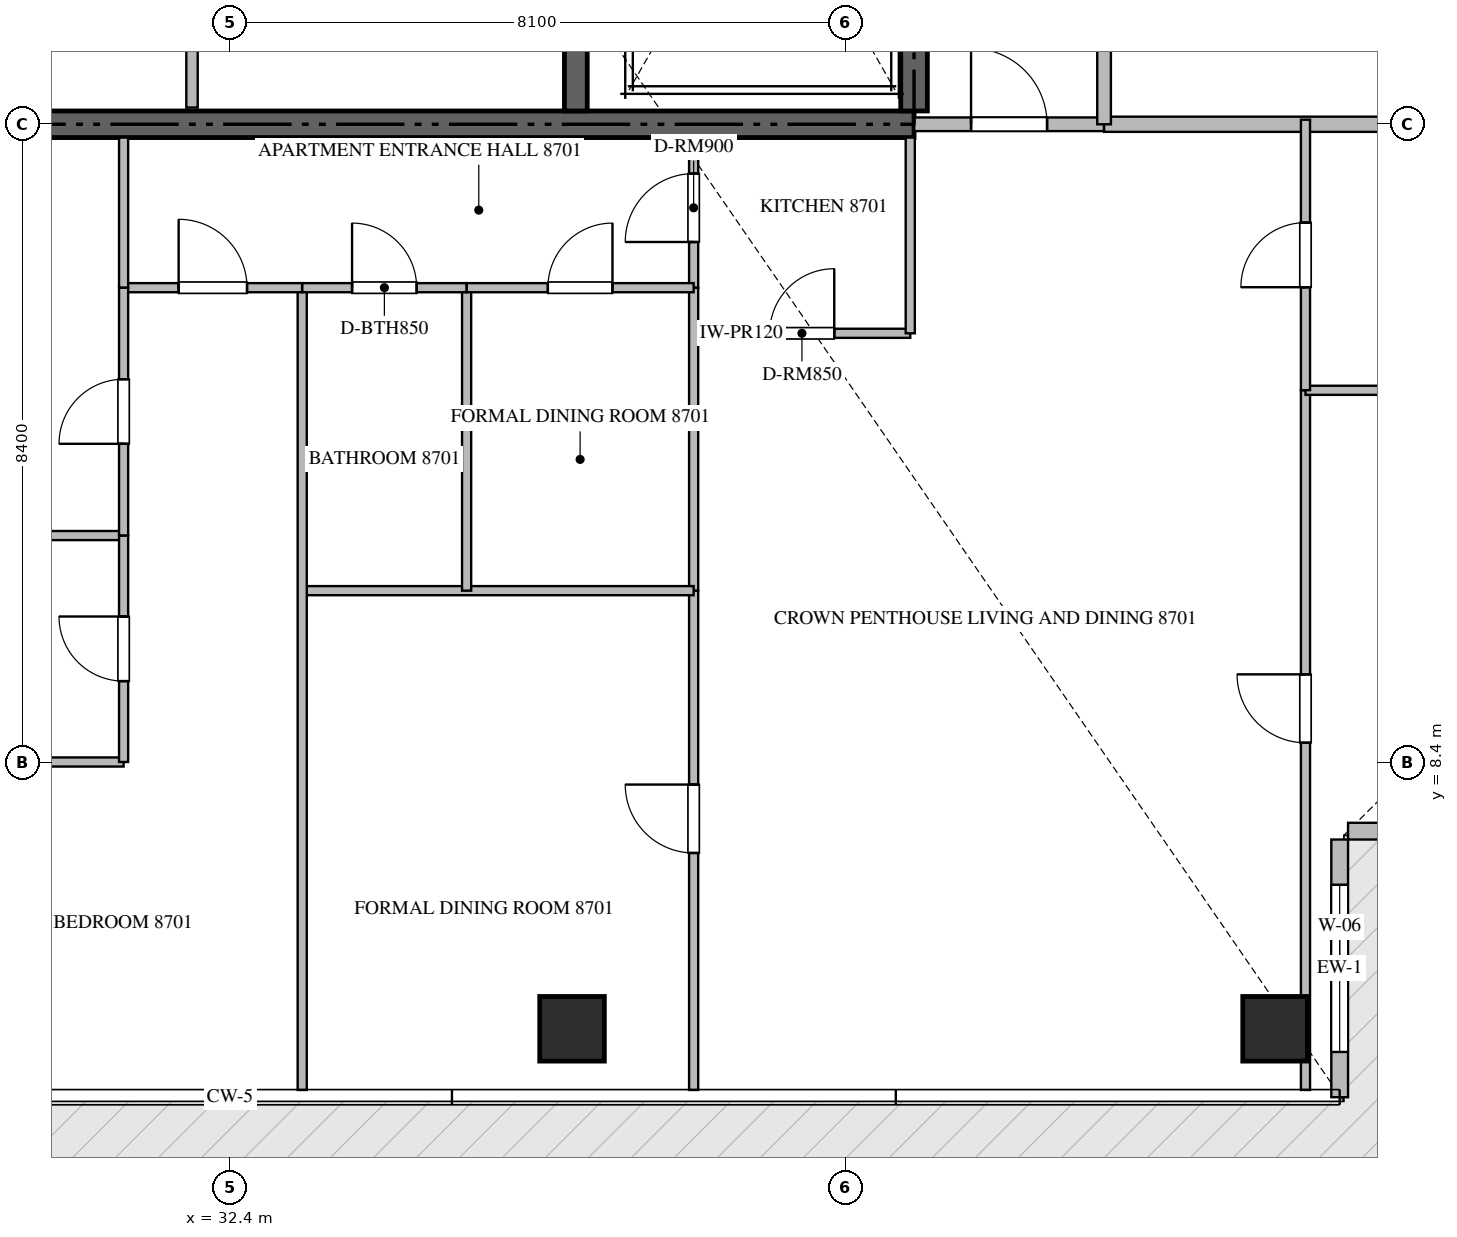
"""IFC4 building model, lengths in metres.
Left out: names, types, materials, properties, quantities, classifications, styles, units other than length and angle.
Written with IfcOpenShell. Run it as: python <this file> out.ifc"""

import sys

from ifc_helpers import new_model, si_unit, direction, frame, frame_2d, origin, origin_2d, place, context, subcontext, project, spatial, rectangle, extrude, source, transform, mapped, element, fill, save


model = new_model("IFC4")
c1 = context("Model", 3, precision=1e-05, world=origin(), true_north=direction((0.0, 1.0)))
c2 = subcontext(c1, "Body", "Model", "MODEL_VIEW")
j1 = project(units=[si_unit("LENGTHUNIT", "METRE"), si_unit("PLANEANGLEUNIT", "RADIAN")], contexts=[c1])
p1 = place(None, origin())
s1 = spatial("IfcSite", under=j1, at=p1, CompositionType="ELEMENT")
p2 = place(p1, origin())
s2 = spatial("IfcBuilding", under=s1, at=p2, CompositionType="ELEMENT")
p3 = place(p2, frame((0.0, 0.0, 353.85)))
s3 = spatial("IfcBuildingStorey", under=s2, at=p3, CompositionType="ELEMENT", Elevation=353.85)
p4 = place(p3, frame((23.4, 16.8, -0.26), z_axis=(0.0, 0.0, 1.0), x_axis=(1.0, 0.0, 0.0)))
e1 = element("IfcWall", 1, at=p4, inside=s3, PredefinedType="SHEAR", context=c2, shape_type="SweptSolid", body=[
    extrude(rectangle(XDim=18.0, YDim=0.35, at=frame_2d((9.0, 0.0))), origin(), (0.0, 0.0, 1.0), 5.798),
])
p5 = place(p3, frame((41.4, 16.975, -0.26), z_axis=(0.0, 0.0, 1.0), x_axis=(0.0, 1.0, 0.0)))
e2 = element("IfcWall", 2, at=p5, inside=s3, PredefinedType="SHEAR", context=c2, shape_type="SweptSolid", body=[
    extrude(rectangle(XDim=8.375, YDim=0.35, at=frame_2d((4.188, 0.0))), origin(), (0.0, 0.0, 1.0), 5.798),
])
p6 = place(p3, frame((36.95, 16.975, -0.26), z_axis=(0.0, 0.0, 1.0), x_axis=(0.0, 1.0, 0.0)))
e3 = element("IfcWall", 3, at=p6, inside=s3, PredefinedType="SHEAR", context=c2, shape_type="SweptSolid", body=[
    extrude(rectangle(XDim=8.375, YDim=0.3, at=frame_2d((4.188, 0.0))), origin(), (0.0, 0.0, 1.0), 5.798),
])
m1 = source(origin(), c2, "Body", "SweptSolid", [
    extrude(rectangle(XDim=0.85, YDim=0.85, at=origin_2d()), origin(), (0.0, 0.0, 1.0), 5.8),
])
for number, where, z_axis, x_axis in (
    (4, (36.9, 4.9, -0.26), (0.0, 0.0, 1.0), (1.0, 0.0, 0.0)),
    (5, (46.15, 4.9, -0.26), (0.0, 0.0, 1.0), (1.0, 0.0, 0.0)),
):
    element("IfcColumn", number, at=place(p3, frame(where, z_axis=z_axis, x_axis=x_axis)), inside=s3, PredefinedType="COLUMN", context=c2, shape_type="MappedRepresentation", body=[
        mapped(m1, transform((0.0, 0.0, 0.0), scale=1.0)),
    ])
p7 = place(p3, frame((47.0, 4.0, 0.0), z_axis=(0.0, 0.0, 1.0), x_axis=(0.0, 1.0, 0.0)))
e6 = element("IfcWall", 6, at=p7, inside=s3, PredefinedType="ELEMENTEDWALL", context=c2, shape_type="SweptSolid", body=[
    extrude(rectangle(XDim=3.39, YDim=0.22, at=frame_2d((1.695, 0.0))), origin(), (0.0, 0.0, 1.0), 5.525),
])
p8 = place(p7, frame((0.595, 0.0, 0.65)))
e7 = element("IfcOpeningElement", 7, at=p8, cuts=e6, PredefinedType="OPENING", context=c2, shape_type="SweptSolid", body=[
    extrude(rectangle(XDim=2.2, YDim=2.4, at=frame_2d((1.1, 1.2))), frame((0.0, 0.12, 0.0), z_axis=(0.0, -1.0, 0.0), x_axis=(1.0, 0.0, 0.0)), (0.0, 0.0, 1.0), 0.24),
])
p9 = place(p3, frame((47.11, 7.5, 0.0), z_axis=(0.0, 0.0, 1.0), x_axis=(1.0, 0.0, 0.0)))
e8 = element("IfcWall", 8, at=p9, inside=s3, PredefinedType="ELEMENTEDWALL", context=c2, shape_type="SweptSolid", body=[
    extrude(rectangle(XDim=3.28, YDim=0.22, at=frame_2d((1.64, 0.0))), origin(), (0.0, 0.0, 1.0), 5.525),
])
p10 = place(p9, frame((0.54, 0.0, 0.65)))
e9 = element("IfcOpeningElement", 9, at=p10, cuts=e8, PredefinedType="OPENING", context=c2, shape_type="SweptSolid", body=[
    extrude(rectangle(XDim=2.2, YDim=2.4, at=frame_2d((1.1, 1.2))), frame((0.0, 0.12, 0.0), z_axis=(0.0, -1.0, 0.0), x_axis=(1.0, 0.0, 0.0)), (0.0, 0.0, 1.0), 0.24),
])
p11 = place(p3, frame((31.9, 17.02, 0.0), z_axis=(0.0, 0.0, 1.0), x_axis=(0.0, 1.0, 0.0)))
e10 = element("IfcWall", 10, at=p11, inside=s3, PredefinedType="PARTITIONING", context=c2, shape_type="SweptSolid", body=[
    extrude(rectangle(XDim=2.73, YDim=0.15, at=frame_2d((1.365, 0.0))), origin(), (0.0, 0.0, 1.0), 5.54),
])
p12 = place(p3, frame((43.9, 16.8, 0.0), z_axis=(0.0, 0.0, 1.0), x_axis=(1.0, 0.0, 0.0)))
e11 = element("IfcWall", 11, at=p12, inside=s3, PredefinedType="PARTITIONING", context=c2, shape_type="SweptSolid", body=[
    extrude(rectangle(XDim=10.018, YDim=0.2, at=frame_2d((5.009, 0.0))), origin(), (0.0, 0.0, 1.0), 5.54),
])
p13 = place(p3, frame((41.402, 16.8, 0.0), z_axis=(0.0, 0.0, 1.0), x_axis=(1.0, 0.0, 0.0)))
e12 = element("IfcWall", 12, at=p13, inside=s3, PredefinedType="PARTITIONING", context=c2, shape_type="SweptSolid", body=[
    extrude(rectangle(XDim=2.496, YDim=0.18, at=frame_2d((1.248, 0.0))), origin(), (0.0, 0.0, 1.0), 5.54),
])
p14 = place(p13, frame((0.748, 0.0, 0.0)))
e13 = element("IfcOpeningElement", 13, at=p14, cuts=e12, PredefinedType="OPENING", context=c2, shape_type="SweptSolid", body=[
    extrude(rectangle(XDim=1.0, YDim=2.15, at=frame_2d((0.5, 1.075))), frame((0.0, 0.1, 0.0), z_axis=(0.0, -1.0, 0.0), x_axis=(1.0, 0.0, 0.0)), (0.0, 0.0, 1.0), 0.2),
])
p15 = place(p3, frame((43.9, 16.8, 0.0), z_axis=(0.0, 0.0, 1.0), x_axis=(0.0, 1.0, 0.0)))
e14 = element("IfcWall", 14, at=p15, inside=s3, PredefinedType="PARTITIONING", context=c2, shape_type="SweptSolid", body=[
    extrude(rectangle(XDim=16.8, YDim=0.18, at=frame_2d((8.4, 0.0))), origin(), (0.0, 0.0, 1.0), 5.54),
])
p16 = place(p15, frame((14.5, 0.0, 0.0)))
e15 = element("IfcOpeningElement", 15, at=p16, cuts=e14, PredefinedType="OPENING", context=c2, shape_type="SweptSolid", body=[
    extrude(rectangle(XDim=1.0, YDim=2.15, at=frame_2d((0.5, 1.075))), frame((0.0, 0.1, 0.0), z_axis=(0.0, -1.0, 0.0), x_axis=(1.0, 0.0, 0.0)), (0.0, 0.0, 1.0), 0.2),
])
p17 = place(p3, frame((38.5, 14.05, 0.0), z_axis=(0.0, 0.0, 1.0), x_axis=(1.0, 0.0, 0.0)))
e16 = element("IfcWall", 16, at=p17, inside=s3, PredefinedType="PARTITIONING", context=c2, shape_type="SweptSolid", body=[
    extrude(rectangle(XDim=2.85, YDim=0.12, at=frame_2d((1.425, 0.0))), origin(), (0.0, 0.0, 1.0), 5.54),
])
p18 = place(p17, frame((1.0, 0.0, 0.0)))
e17 = element("IfcOpeningElement", 17, at=p18, cuts=e16, PredefinedType="OPENING", context=c2, shape_type="SweptSolid", body=[
    extrude(rectangle(XDim=0.85, YDim=2.1, at=frame_2d((0.425, 1.05))), frame((0.0, 0.07, 0.0), z_axis=(0.0, -1.0, 0.0), x_axis=(1.0, 0.0, 0.0)), (0.0, 0.0, 1.0), 0.14),
])
p19 = place(p3, frame((41.35, 14.05, 0.0), z_axis=(0.0, 0.0, 1.0), x_axis=(0.0, 1.0, 0.0)))
e18 = element("IfcWall", 18, at=p19, inside=s3, PredefinedType="PARTITIONING", context=c2, shape_type="SweptSolid", body=[
    extrude(rectangle(XDim=2.575, YDim=0.12, at=frame_2d((1.288, 0.0))), origin(), (0.0, 0.0, 1.0), 5.54),
])
p20 = place(p3, frame((38.5, 14.65, 0.0), z_axis=(0.0, 0.0, 1.0), x_axis=(0.0, 1.0, 0.0)))
e19 = element("IfcWall", 19, at=p20, inside=s3, PredefinedType="PARTITIONING", context=c2, shape_type="SweptSolid", body=[
    extrude(rectangle(XDim=1.975, YDim=0.12, at=frame_2d((0.988, 0.0))), origin(), (0.0, 0.0, 1.0), 5.54),
])
p21 = place(p20, frame((0.601, 0.0, 0.0)))
e20 = element("IfcOpeningElement", 20, at=p21, cuts=e19, PredefinedType="OPENING", context=c2, shape_type="SweptSolid", body=[
    extrude(rectangle(XDim=0.9, YDim=2.1, at=frame_2d((0.45, 1.05))), frame((0.0, 0.07, 0.0), z_axis=(0.0, -1.0, 0.0), x_axis=(1.0, 0.0, 0.0)), (0.0, 0.0, 1.0), 0.14),
])
p22 = place(p3, frame((38.5, 4.095, 0.0), z_axis=(0.0, 0.0, 1.0), x_axis=(0.0, 1.0, 0.0)))
e21 = element("IfcWall", 21, at=p22, inside=s3, PredefinedType="PARTITIONING", context=c2, shape_type="SweptSolid", body=[
    extrude(rectangle(XDim=6.569, YDim=0.12, at=frame_2d((3.285, 0.0))), origin(), (0.0, 0.0, 1.0), 5.54),
])
p23 = place(p22, frame((3.118, 0.0, 0.0)))
e22 = element("IfcOpeningElement", 22, at=p23, cuts=e21, PredefinedType="OPENING", context=c2, shape_type="SweptSolid", body=[
    extrude(rectangle(XDim=0.9, YDim=2.1, at=frame_2d((0.45, 1.05))), frame((0.0, 0.07, 0.0), z_axis=(0.0, -1.0, 0.0), x_axis=(1.0, 0.0, 0.0)), (0.0, 0.0, 1.0), 0.14),
])
p24 = place(p3, frame((38.5, 10.666, 0.0), z_axis=(0.0, 0.0, 1.0), x_axis=(0.0, 1.0, 0.0)))
e23 = element("IfcWall", 23, at=p24, inside=s3, PredefinedType="PARTITIONING", context=c2, shape_type="SweptSolid", body=[
    extrude(rectangle(XDim=3.982, YDim=0.12, at=frame_2d((1.991, 0.0))), origin(), (0.0, 0.0, 1.0), 5.54),
])
p25 = place(p3, frame((33.35, 10.664, 0.0), z_axis=(0.0, 0.0, 1.0), x_axis=(1.0, 0.0, 0.0)))
e24 = element("IfcWall", 24, at=p25, inside=s3, PredefinedType="PARTITIONING", context=c2, shape_type="SweptSolid", body=[
    extrude(rectangle(XDim=5.15, YDim=0.12, at=frame_2d((2.575, 0.0))), origin(), (0.0, 0.0, 1.0), 5.54),
])
p26 = place(p3, frame((33.35, 4.095, 0.0), z_axis=(0.0, 0.0, 1.0), x_axis=(0.0, 1.0, 0.0)))
e25 = element("IfcWall", 25, at=p26, inside=s3, PredefinedType="PARTITIONING", context=c2, shape_type="SweptSolid", body=[
    extrude(rectangle(XDim=10.555, YDim=0.12, at=frame_2d((5.277, 0.0))), origin(), (0.0, 0.0, 1.0), 5.54),
])
p27 = place(p3, frame((35.513, 10.664, 0.0), z_axis=(0.0, 0.0, 1.0), x_axis=(0.0, 1.0, 0.0)))
e26 = element("IfcWall", 26, at=p27, inside=s3, PredefinedType="PARTITIONING", context=c2, shape_type="SweptSolid", body=[
    extrude(rectangle(XDim=3.986, YDim=0.12, at=frame_2d((1.993, 0.0))), origin(), (0.0, 0.0, 1.0), 5.54),
])
p28 = place(p3, frame((33.35, 14.65, 0.0), z_axis=(0.0, 0.0, 1.0), x_axis=(1.0, 0.0, 0.0)))
e27 = element("IfcWall", 27, at=p28, inside=s3, PredefinedType="PARTITIONING", context=c2, shape_type="SweptSolid", body=[
    extrude(rectangle(XDim=2.163, YDim=0.12, at=frame_2d((1.082, 0.0))), origin(), (0.0, 0.0, 1.0), 5.54),
])
p29 = place(p28, frame((0.656, 0.0, 0.0)))
e28 = element("IfcOpeningElement", 28, at=p29, cuts=e27, PredefinedType="OPENING", context=c2, shape_type="SweptSolid", body=[
    extrude(rectangle(XDim=0.85, YDim=2.1, at=frame_2d((0.425, 1.05))), frame((0.0, 0.07, 0.0), z_axis=(0.0, -1.0, 0.0), x_axis=(1.0, 0.0, 0.0)), (0.0, 0.0, 1.0), 0.14),
])
p30 = place(p3, frame((35.515, 14.65, 0.0), z_axis=(0.0, 0.0, 1.0), x_axis=(1.0, 0.0, 0.0)))
e29 = element("IfcWall", 29, at=p30, inside=s3, PredefinedType="PARTITIONING", context=c2, shape_type="SweptSolid", body=[
    extrude(rectangle(XDim=2.985, YDim=0.12, at=frame_2d((1.493, 0.0))), origin(), (0.0, 0.0, 1.0), 5.54),
])
p31 = place(p30, frame((1.067, 0.0, 0.0)))
e30 = element("IfcOpeningElement", 30, at=p31, cuts=e29, PredefinedType="OPENING", context=c2, shape_type="SweptSolid", body=[
    extrude(rectangle(XDim=0.85, YDim=2.1, at=frame_2d((0.425, 1.05))), frame((0.0, 0.07, 0.0), z_axis=(0.0, -1.0, 0.0), x_axis=(1.0, 0.0, 0.0)), (0.0, 0.0, 1.0), 0.14),
])
p32 = place(p3, frame((31.0, 14.65, 0.0), z_axis=(0.0, 0.0, 1.0), x_axis=(1.0, 0.0, 0.0)))
e31 = element("IfcWall", 31, at=p32, inside=s3, PredefinedType="PARTITIONING", context=c2, shape_type="SweptSolid", body=[
    extrude(rectangle(XDim=2.348, YDim=0.12, at=frame_2d((1.174, 0.0))), origin(), (0.0, 0.0, 1.0), 5.54),
])
p33 = place(p32, frame((0.724, 0.0, 0.0)))
e32 = element("IfcOpeningElement", 32, at=p33, cuts=e31, PredefinedType="OPENING", context=c2, shape_type="SweptSolid", body=[
    extrude(rectangle(XDim=0.9, YDim=2.1, at=frame_2d((0.45, 1.05))), frame((0.0, 0.07, 0.0), z_axis=(0.0, -1.0, 0.0), x_axis=(1.0, 0.0, 0.0)), (0.0, 0.0, 1.0), 0.14),
])
for number, where, z_axis, x_axis in (
    (33, (26.3, 8.41, 0.0), (0.0, 0.0, 1.0), (1.0, 0.0, 0.0)),
    (34, (26.3, 11.389, 0.0), (0.0, 0.0, 1.0), (1.0, 0.0, 0.0)),
):
    element("IfcWall", number, at=place(p3, frame(where, z_axis=z_axis, x_axis=x_axis)), inside=s3, PredefinedType="PARTITIONING", context=c2, shape_type="SweptSolid", body=[
        extrude(rectangle(XDim=4.7, YDim=0.12, at=frame_2d((2.35, 0.0))), origin(), (0.0, 0.0, 1.0), 5.54),
    ])
p34 = place(p3, frame((31.0, 8.41, 0.0), z_axis=(0.0, 0.0, 1.0), x_axis=(0.0, 1.0, 0.0)))
e35 = element("IfcWall", 35, at=p34, inside=s3, PredefinedType="PARTITIONING", context=c2, shape_type="SweptSolid", body=[
    extrude(rectangle(XDim=2.979, YDim=0.12, at=frame_2d((1.49, 0.0))), origin(), (0.0, 0.0, 1.0), 5.54),
])
p35 = place(p34, frame((1.064, 0.0, 0.0)))
e36 = element("IfcOpeningElement", 36, at=p35, cuts=e35, PredefinedType="OPENING", context=c2, shape_type="SweptSolid", body=[
    extrude(rectangle(XDim=0.85, YDim=2.1, at=frame_2d((0.425, 1.05))), frame((0.0, 0.07, 0.0), z_axis=(0.0, -1.0, 0.0), x_axis=(1.0, 0.0, 0.0)), (0.0, 0.0, 1.0), 0.14),
])
p36 = place(p3, frame((31.0, 11.391, 0.0), z_axis=(0.0, 0.0, 1.0), x_axis=(0.0, 1.0, 0.0)))
e37 = element("IfcWall", 37, at=p36, inside=s3, PredefinedType="PARTITIONING", context=c2, shape_type="SweptSolid", body=[
    extrude(rectangle(XDim=3.259, YDim=0.12, at=frame_2d((1.629, 0.0))), origin(), (0.0, 0.0, 1.0), 5.54),
])
p37 = place(p36, frame((1.205, 0.0, 0.0)))
e38 = element("IfcOpeningElement", 38, at=p37, cuts=e37, PredefinedType="OPENING", context=c2, shape_type="SweptSolid", body=[
    extrude(rectangle(XDim=0.85, YDim=2.1, at=frame_2d((0.425, 1.05))), frame((0.0, 0.07, 0.0), z_axis=(0.0, -1.0, 0.0), x_axis=(1.0, 0.0, 0.0)), (0.0, 0.0, 1.0), 0.14),
])
p38 = place(p3, frame((31.0, 14.652, 0.0), z_axis=(0.0, 0.0, 1.0), x_axis=(0.0, 1.0, 0.0)))
e39 = element("IfcWall", 39, at=p38, inside=s3, PredefinedType="PARTITIONING", context=c2, shape_type="SweptSolid", body=[
    extrude(rectangle(XDim=1.973, YDim=0.12, at=frame_2d((0.986, 0.0))), origin(), (0.0, 0.0, 1.0), 5.54),
])
p39 = place(p3, frame((46.55, 4.095, 0.0), z_axis=(0.0, 0.0, 1.0), x_axis=(0.0, 1.0, 0.0)))
e40 = element("IfcWall", 40, at=p39, inside=s3, PredefinedType="PARTITIONING", context=c2, shape_type="SweptSolid", body=[
    extrude(rectangle(XDim=9.205, YDim=0.12, at=frame_2d((4.603, 0.0))), origin(), (0.0, 0.0, 1.0), 5.54),
])
p40 = place(p39, frame((4.568, 0.0, 0.0)))
e41 = element("IfcOpeningElement", 41, at=p40, cuts=e40, PredefinedType="OPENING", context=c2, shape_type="SweptSolid", body=[
    extrude(rectangle(XDim=0.9, YDim=2.1, at=frame_2d((0.45, 1.05))), frame((0.0, 0.07, 0.0), z_axis=(0.0, -1.0, 0.0), x_axis=(1.0, 0.0, 0.0)), (0.0, 0.0, 1.0), 0.14),
])
p41 = place(p3, frame((46.55, 13.3, 0.0), z_axis=(0.0, 0.0, 1.0), x_axis=(1.0, 0.0, 0.0)))
e42 = element("IfcWall", 42, at=p41, inside=s3, PredefinedType="PARTITIONING", context=c2, shape_type="SweptSolid", body=[
    extrude(rectangle(XDim=7.355, YDim=0.12, at=frame_2d((3.677, 0.0))), origin(), (0.0, 0.0, 1.0), 5.54),
])
p42 = place(p3, frame((46.55, 13.302, 0.0), z_axis=(0.0, 0.0, 1.0), x_axis=(0.0, 1.0, 0.0)))
e43 = element("IfcWall", 43, at=p42, inside=s3, PredefinedType="PARTITIONING", context=c2, shape_type="SweptSolid", body=[
    extrude(rectangle(XDim=3.558, YDim=0.12, at=frame_2d((1.779, 0.0))), origin(), (0.0, 0.0, 1.0), 5.54),
])
p43 = place(p42, frame((1.354, 0.0, 0.0)))
e44 = element("IfcOpeningElement", 44, at=p43, cuts=e43, PredefinedType="OPENING", context=c2, shape_type="SweptSolid", body=[
    extrude(rectangle(XDim=0.85, YDim=2.1, at=frame_2d((0.425, 1.05))), frame((0.0, 0.07, 0.0), z_axis=(0.0, -1.0, 0.0), x_axis=(1.0, 0.0, 0.0)), (0.0, 0.0, 1.0), 0.14),
])
m2 = source(origin(), c2, "Body", "SweptSolid", [
    extrude(rectangle(XDim=2.2, YDim=2.4, at=frame_2d((1.1, 1.2))), frame((0.0, 0.03, 0.0), z_axis=(0.0, -1.0, 0.0), x_axis=(1.0, 0.0, 0.0)), (0.0, 0.0, 1.0), 0.06),
])
p44 = place(p8, origin())
e45 = element("IfcWindow", 45, at=p44, inside=s3, PartitioningType="SINGLE_PANEL", PredefinedType="WINDOW", context=c2, shape_type="MappedRepresentation", body=[
    mapped(m2, transform((0.0, 0.0, 0.0), scale=1.0)),
])
fill(e7, e45)
m3 = source(origin(), c2, "Body", "SweptSolid", [
    extrude(rectangle(XDim=1.0, YDim=2.15, at=frame_2d((0.5, 1.075))), frame((0.0, 0.025, 0.0), z_axis=(0.0, -1.0, 0.0), x_axis=(1.0, 0.0, 0.0)), (0.0, 0.0, 1.0), 0.05),
])
p45 = place(p14, origin())
e46 = element("IfcDoor", 46, at=p45, inside=s3, OperationType="SINGLE_SWING_LEFT", PredefinedType="DOOR", context=c2, shape_type="MappedRepresentation", body=[
    mapped(m3, transform((0.0, 0.0, 0.0), scale=1.0)),
])
fill(e13, e46)
m4 = source(origin(), c2, "Body", "SweptSolid", [
    extrude(rectangle(XDim=0.85, YDim=2.1, at=frame_2d((0.425, 1.05))), frame((0.0, 0.025, 0.0), z_axis=(0.0, -1.0, 0.0), x_axis=(1.0, 0.0, 0.0)), (0.0, 0.0, 1.0), 0.05),
])
p46 = place(p18, origin())
e47 = element("IfcDoor", 47, at=p46, inside=s3, OperationType="SINGLE_SWING_RIGHT", PredefinedType="DOOR", context=c2, shape_type="MappedRepresentation", body=[
    mapped(m4, transform((0.0, 0.0, 0.0), scale=1.0)),
])
fill(e17, e47)
m5 = source(origin(), c2, "Body", "SweptSolid", [
    extrude(rectangle(XDim=0.9, YDim=2.1, at=frame_2d((0.45, 1.05))), frame((0.0, 0.025, 0.0), z_axis=(0.0, -1.0, 0.0), x_axis=(1.0, 0.0, 0.0)), (0.0, 0.0, 1.0), 0.05),
])
p47 = place(p21, origin())
e48 = element("IfcDoor", 48, at=p47, inside=s3, OperationType="SINGLE_SWING_LEFT", PredefinedType="DOOR", context=c2, shape_type="MappedRepresentation", body=[
    mapped(m5, transform((0.0, 0.0, 0.0), scale=1.0)),
])
fill(e20, e48)
p48 = place(p23, origin())
e49 = element("IfcDoor", 49, at=p48, inside=s3, OperationType="SINGLE_SWING_RIGHT", PredefinedType="DOOR", context=c2, shape_type="MappedRepresentation", body=[
    mapped(m5, transform((0.0, 0.0, 0.0), scale=1.0)),
])
fill(e22, e49)
p49 = place(p29, origin())
e50 = element("IfcDoor", 50, at=p49, inside=s3, OperationType="SINGLE_SWING_LEFT", PredefinedType="DOOR", context=c2, shape_type="MappedRepresentation", body=[
    mapped(m4, transform((0.0, 0.0, 0.0), scale=1.0)),
])
fill(e28, e50)
p50 = place(p31, origin())
e51 = element("IfcDoor", 51, at=p50, inside=s3, OperationType="SINGLE_SWING_RIGHT", PredefinedType="DOOR", context=c2, shape_type="MappedRepresentation", body=[
    mapped(m4, transform((0.0, 0.0, 0.0), scale=1.0)),
])
fill(e30, e51)
p51 = place(p33, origin())
e52 = element("IfcDoor", 52, at=p51, inside=s3, OperationType="SINGLE_SWING_LEFT", PredefinedType="DOOR", context=c2, shape_type="MappedRepresentation", body=[
    mapped(m5, transform((0.0, 0.0, 0.0), scale=1.0)),
])
fill(e32, e52)
p52 = place(p35, origin())
e53 = element("IfcDoor", 53, at=p52, inside=s3, OperationType="SINGLE_SWING_RIGHT", PredefinedType="DOOR", context=c2, shape_type="MappedRepresentation", body=[
    mapped(m4, transform((0.0, 0.0, 0.0), scale=1.0)),
])
fill(e36, e53)
p53 = place(p37, origin())
e54 = element("IfcDoor", 54, at=p53, inside=s3, OperationType="SINGLE_SWING_LEFT", PredefinedType="DOOR", context=c2, shape_type="MappedRepresentation", body=[
    mapped(m4, transform((0.0, 0.0, 0.0), scale=1.0)),
])
fill(e38, e54)
p54 = place(p40, origin())
e55 = element("IfcDoor", 55, at=p54, inside=s3, OperationType="SINGLE_SWING_RIGHT", PredefinedType="DOOR", context=c2, shape_type="MappedRepresentation", body=[
    mapped(m5, transform((0.0, 0.0, 0.0), scale=1.0)),
])
fill(e41, e55)
p55 = place(p43, origin())
e56 = element("IfcDoor", 56, at=p55, inside=s3, OperationType="SINGLE_SWING_LEFT", PredefinedType="DOOR", context=c2, shape_type="MappedRepresentation", body=[
    mapped(m4, transform((0.0, 0.0, 0.0), scale=1.0)),
])
fill(e44, e56)
save(model, sys.argv[1])
